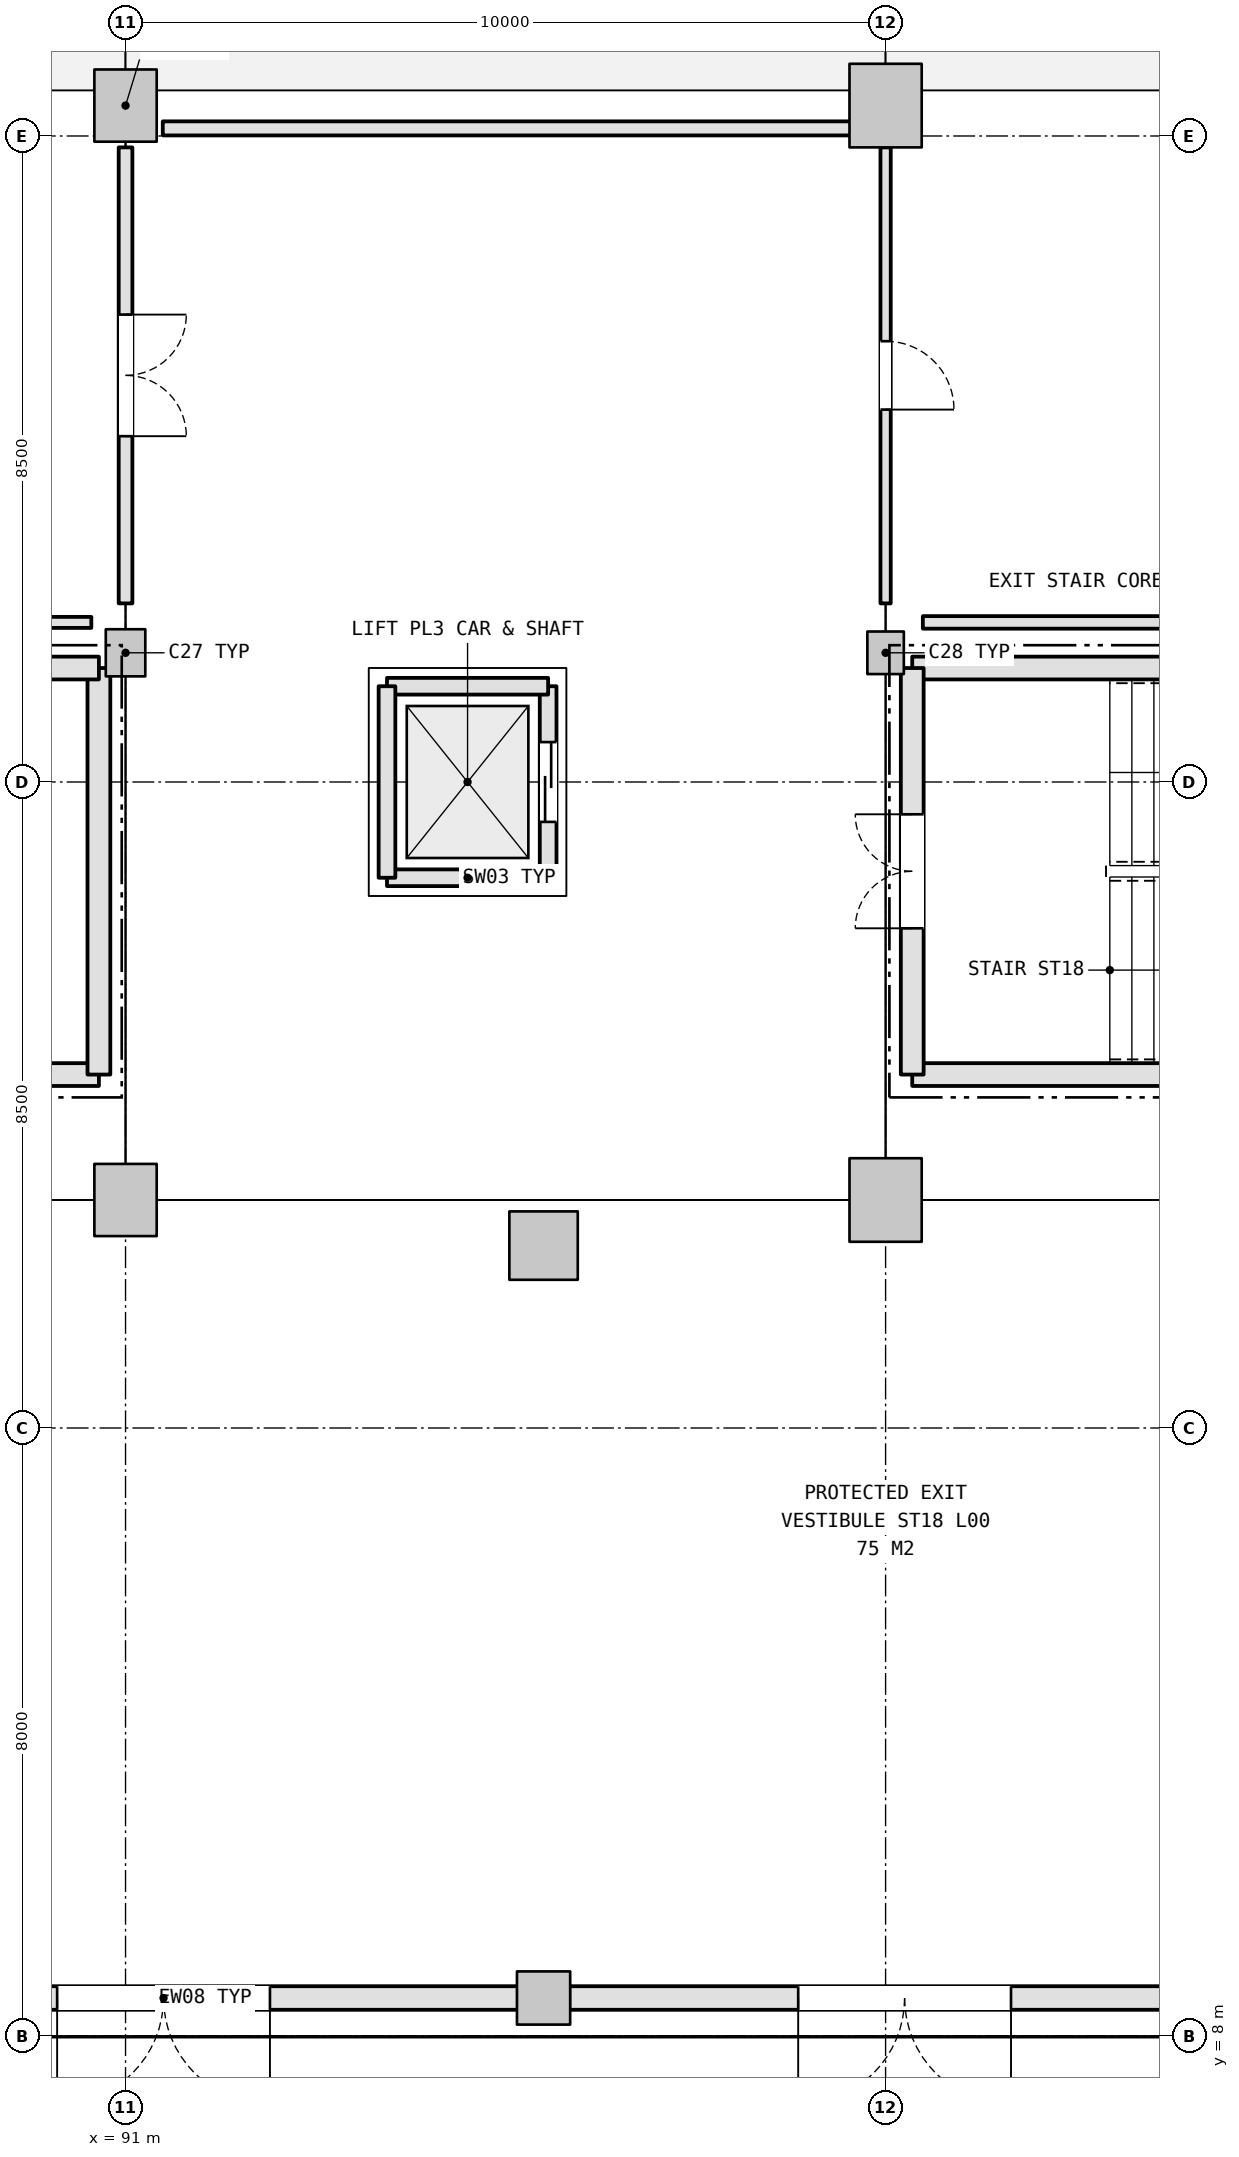
"""IFC4 building model, lengths in metres.
Left out: names, types, materials, properties, quantities, classifications, styles, units other than length and angle.
Written with IfcOpenShell. Run it as: python <this file> out.ifc"""

import sys

from ifc_helpers import new_model, si_unit, direction, frame, frame_2d, origin, origin_2d, place, context, subcontext, project, spatial, rectangle, extrude, element, fill, save


model = new_model("IFC4")
c1 = context("Model", 3, precision=1e-05, world=origin(), true_north=direction((0.0, 1.0)))
c2 = subcontext(c1, "Body", "Model", "MODEL_VIEW")
j1 = project(units=[si_unit("LENGTHUNIT", "METRE"), si_unit("PLANEANGLEUNIT", "RADIAN")], contexts=[c1])
p1 = place(None, origin())
s1 = spatial("IfcSite", under=j1, at=p1, CompositionType="ELEMENT")
p2 = place(p1, origin())
s2 = spatial("IfcBuilding", under=s1, at=p2, CompositionType="ELEMENT")
p3 = place(p2, origin())
s3 = spatial("IfcBuildingStorey", under=s2, at=p3, CompositionType="ELEMENT", Elevation=0.0)
p4 = place(p3, frame((91.0, 33.4, 0.0), z_axis=(0.0, 0.0, 1.0), x_axis=(1.0, 0.0, 0.0)))
e1 = element("IfcColumn", 1, at=p4, inside=s3, PredefinedType="COLUMN", context=c2, shape_type="SweptSolid", body=[
    extrude(rectangle(XDim=0.82, YDim=0.95, at=origin_2d()), origin(), (0.0, 0.0, 1.0), 5.4),
])
p5 = place(p3, frame((91.0, 26.2, 0.0), z_axis=(0.0, 0.0, 1.0), x_axis=(1.0, 0.0, 0.0)))
e2 = element("IfcColumn", 2, at=p5, inside=s3, PredefinedType="COLUMN", context=c2, shape_type="SweptSolid", body=[
    extrude(rectangle(XDim=0.52, YDim=0.62, at=origin_2d()), origin(), (0.0, 0.0, 1.0), 5.4),
])
p6 = place(p3, frame((91.0, 19.0, 0.0), z_axis=(0.0, 0.0, 1.0), x_axis=(1.0, 0.0, 0.0)))
e3 = element("IfcColumn", 3, at=p6, inside=s3, PredefinedType="COLUMN", context=c2, shape_type="SweptSolid", body=[
    extrude(rectangle(XDim=0.82, YDim=0.95, at=origin_2d()), origin(), (0.0, 0.0, 1.0), 5.4),
])
p7 = place(p3, frame((101.0, 33.4, 0.0), z_axis=(0.0, 0.0, 1.0), x_axis=(1.0, 0.0, 0.0)))
e4 = element("IfcColumn", 4, at=p7, inside=s3, PredefinedType="COLUMN", context=c2, shape_type="SweptSolid", body=[
    extrude(rectangle(XDim=0.95, YDim=1.1, at=origin_2d()), origin(), (0.0, 0.0, 1.0), 5.4),
])
p8 = place(p3, frame((101.0, 26.2, 0.0), z_axis=(0.0, 0.0, 1.0), x_axis=(1.0, 0.0, 0.0)))
e5 = element("IfcColumn", 5, at=p8, inside=s3, PredefinedType="COLUMN", context=c2, shape_type="SweptSolid", body=[
    extrude(rectangle(XDim=0.48, YDim=0.56, at=origin_2d()), origin(), (0.0, 0.0, 1.0), 5.4),
])
p9 = place(p3, frame((101.0, 19.0, 0.0), z_axis=(0.0, 0.0, 1.0), x_axis=(1.0, 0.0, 0.0)))
e6 = element("IfcColumn", 6, at=p9, inside=s3, PredefinedType="COLUMN", context=c2, shape_type="SweptSolid", body=[
    extrude(rectangle(XDim=0.95, YDim=1.1, at=origin_2d()), origin(), (0.0, 0.0, 1.0), 5.4),
])
p10 = place(p3, frame((96.5, 8.5, 0.0), z_axis=(0.0, 0.0, 1.0), x_axis=(1.0, 0.0, 0.0)))
e7 = element("IfcColumn", 7, at=p10, inside=s3, PredefinedType="COLUMN", context=c2, shape_type="SweptSolid", body=[
    extrude(rectangle(XDim=0.7, YDim=0.7, at=origin_2d()), origin(), (0.0, 0.0, 1.0), 5.4),
])
p11 = place(p3, frame((96.5, 18.4, 0.0), z_axis=(0.0, 0.0, 1.0), x_axis=(1.0, 0.0, 0.0)))
e8 = element("IfcColumn", 8, at=p11, inside=s3, PredefinedType="COLUMN", context=c2, shape_type="SweptSolid", body=[
    extrude(rectangle(XDim=0.9, YDim=0.9, at=origin_2d()), origin(), (0.0, 0.0, 1.0), 5.4),
])
p12 = place(p3, frame((86.838, 8.5, 0.0), z_axis=(0.0, 0.0, 1.0), x_axis=(1.0, 0.0, 0.0)))
e9 = element("IfcWall", 9, at=p12, inside=s3, PredefinedType="STANDARD", context=c2, shape_type="SweptSolid", body=[
    extrude(rectangle(XDim=9.324, YDim=0.31, at=frame_2d((4.662, 0.0))), origin(), (0.0, 0.0, 1.0), 4.592),
])
p13 = place(p12, frame((3.262, 0.0, 0.0)))
e10 = element("IfcOpeningElement", 10, at=p13, cuts=e9, PredefinedType="OPENING", context=c2, shape_type="SweptSolid", body=[
    extrude(rectangle(XDim=2.8, YDim=2.5, at=frame_2d((1.4, 1.25))), frame((0.0, 0.165, 0.0), z_axis=(0.0, -1.0, 0.0), x_axis=(1.0, 0.0, 0.0)), (0.0, 0.0, 1.0), 0.33),
])
p14 = place(p3, frame((96.838, 8.5, 0.0), z_axis=(0.0, 0.0, 1.0), x_axis=(1.0, 0.0, 0.0)))
e11 = element("IfcWall", 11, at=p14, inside=s3, PredefinedType="STANDARD", context=c2, shape_type="SweptSolid", body=[
    extrude(rectangle(XDim=8.824, YDim=0.31, at=frame_2d((4.412, 0.0))), origin(), (0.0, 0.0, 1.0), 4.592),
])
p15 = place(p14, frame((3.012, 0.0, 0.0)))
e12 = element("IfcOpeningElement", 12, at=p15, cuts=e11, PredefinedType="OPENING", context=c2, shape_type="SweptSolid", body=[
    extrude(rectangle(XDim=2.8, YDim=2.5, at=frame_2d((1.4, 1.25))), frame((0.0, 0.165, 0.0), z_axis=(0.0, -1.0, 0.0), x_axis=(1.0, 0.0, 0.0)), (0.0, 0.0, 1.0), 0.33),
])
p16 = place(p3, frame((81.35, 20.65, 0.0), z_axis=(0.0, 0.0, 1.0), x_axis=(1.0, 0.0, 0.0)))
e13 = element("IfcWall", 13, at=p16, inside=s3, PredefinedType="SHEAR", context=c2, shape_type="SweptSolid", body=[
    extrude(rectangle(XDim=9.299, YDim=0.3, at=frame_2d((4.65, 0.0))), origin(), (0.0, 0.0, 1.0), 5.14),
])
p17 = place(p3, frame((90.65, 20.65, 0.0), z_axis=(0.0, 0.0, 1.0), x_axis=(0.0, 1.0, 0.0)))
e14 = element("IfcWall", 14, at=p17, inside=s3, PredefinedType="SHEAR", context=c2, shape_type="SweptSolid", body=[
    extrude(rectangle(XDim=5.349, YDim=0.3, at=frame_2d((2.675, 0.0))), origin(), (0.0, 0.0, 1.0), 5.14),
])
for number, where, z_axis, x_axis in (
    (15, (90.65, 26.0, 0.0), (0.0, 0.0, 1.0), (-1.0, 0.0, 0.0)),
    (16, (101.35, 20.65, 0.0), (0.0, 0.0, 1.0), (1.0, 0.0, 0.0)),
    (17, (110.65, 26.0, 0.0), (0.0, 0.0, 1.0), (-1.0, 0.0, 0.0)),
):
    element("IfcWall", number, at=place(p3, frame(where, z_axis=z_axis, x_axis=x_axis)), inside=s3, PredefinedType="SHEAR", context=c2, shape_type="SweptSolid", body=[
        extrude(rectangle(XDim=9.299, YDim=0.3, at=frame_2d((4.65, 0.0))), origin(), (0.0, 0.0, 1.0), 5.14),
    ])
p18 = place(p3, frame((101.35, 26.0, 0.0), z_axis=(0.0, 0.0, 1.0), x_axis=(0.0, -1.0, 0.0)))
e18 = element("IfcWall", 18, at=p18, inside=s3, PredefinedType="SHEAR", context=c2, shape_type="SweptSolid", body=[
    extrude(rectangle(XDim=5.349, YDim=0.3, at=frame_2d((2.675, 0.0))), origin(), (0.0, 0.0, 1.0), 5.14),
])
p19 = place(p18, frame((1.925, 0.0, 0.0)))
e19 = element("IfcOpeningElement", 19, at=p19, cuts=e18, PredefinedType="OPENING", context=c2, shape_type="SweptSolid", body=[
    extrude(rectangle(XDim=1.5, YDim=2.2, at=frame_2d((0.75, 1.1))), frame((0.0, 0.16, 0.0), z_axis=(0.0, -1.0, 0.0), x_axis=(1.0, 0.0, 0.0)), (0.0, 0.0, 1.0), 0.32),
])
p20 = place(p3, frame((94.44, 23.24, -1.1), z_axis=(0.0, 0.0, 1.0), x_axis=(1.0, 0.0, 0.0)))
e20 = element("IfcWall", 20, at=p20, inside=s3, PredefinedType="SHEAR", context=c2, shape_type="SweptSolid", body=[
    extrude(rectangle(XDim=2.12, YDim=0.22, at=frame_2d((1.06, 0.0))), origin(), (0.0, 0.0, 1.0), 6.24),
])
p21 = place(p3, frame((96.56, 23.24, -1.1), z_axis=(0.0, 0.0, 1.0), x_axis=(0.0, 1.0, 0.0)))
e21 = element("IfcWall", 21, at=p21, inside=s3, PredefinedType="SHEAR", context=c2, shape_type="SweptSolid", body=[
    extrude(rectangle(XDim=2.52, YDim=0.22, at=frame_2d((1.26, 0.0))), origin(), (0.0, 0.0, 1.0), 6.24),
])
p22 = place(p21, frame((0.735, 0.0, 1.1)))
e22 = element("IfcOpeningElement", 22, at=p22, cuts=e21, PredefinedType="OPENING", context=c2, shape_type="SweptSolid", body=[
    extrude(rectangle(XDim=1.05, YDim=2.15, at=frame_2d((0.525, 1.075))), frame((0.0, 0.12, 0.0), z_axis=(0.0, -1.0, 0.0), x_axis=(1.0, 0.0, 0.0)), (0.0, 0.0, 1.0), 0.24),
])
p23 = place(p3, frame((96.56, 25.76, -1.1), z_axis=(0.0, 0.0, 1.0), x_axis=(-1.0, 0.0, 0.0)))
e23 = element("IfcWall", 23, at=p23, inside=s3, PredefinedType="SHEAR", context=c2, shape_type="SweptSolid", body=[
    extrude(rectangle(XDim=2.12, YDim=0.22, at=frame_2d((1.06, 0.0))), origin(), (0.0, 0.0, 1.0), 6.24),
])
p24 = place(p3, frame((94.44, 25.76, -1.1), z_axis=(0.0, 0.0, 1.0), x_axis=(0.0, -1.0, 0.0)))
e24 = element("IfcWall", 24, at=p24, inside=s3, PredefinedType="SHEAR", context=c2, shape_type="SweptSolid", body=[
    extrude(rectangle(XDim=2.52, YDim=0.22, at=frame_2d((1.26, 0.0))), origin(), (0.0, 0.0, 1.0), 6.24),
])
p25 = place(p3, frame((91.0, 32.85, 0.0), z_axis=(0.0, 0.0, 1.0), x_axis=(0.0, -1.0, 0.0)))
e25 = element("IfcWall", 25, at=p25, inside=s3, PredefinedType="PARTITIONING", context=c2, shape_type="SweptSolid", body=[
    extrude(rectangle(XDim=6.0, YDim=0.18, at=frame_2d((3.0, 0.0))), origin(), (0.0, 0.0, 1.0), 4.305),
])
p26 = place(p25, frame((2.2, 0.0, 0.0)))
e26 = element("IfcOpeningElement", 26, at=p26, cuts=e25, PredefinedType="OPENING", context=c2, shape_type="SweptSolid", body=[
    extrude(rectangle(XDim=1.6, YDim=2.2, at=frame_2d((0.8, 1.1))), frame((0.0, 0.1, 0.0), z_axis=(0.0, -1.0, 0.0), x_axis=(1.0, 0.0, 0.0)), (0.0, 0.0, 1.0), 0.2),
])
p27 = place(p3, frame((90.55, 26.6, 0.0), z_axis=(0.0, 0.0, 1.0), x_axis=(-1.0, 0.0, 0.0)))
e27 = element("IfcWall", 27, at=p27, inside=s3, PredefinedType="PARTITIONING", context=c2, shape_type="SweptSolid", body=[
    extrude(rectangle(XDim=9.06, YDim=0.145, at=frame_2d((4.53, 0.0))), origin(), (0.0, 0.0, 1.0), 5.12),
])
p28 = place(p3, frame((101.0, 32.85, 0.0), z_axis=(0.0, 0.0, 1.0), x_axis=(0.0, -1.0, 0.0)))
e28 = element("IfcWall", 28, at=p28, inside=s3, PredefinedType="PARTITIONING", context=c2, shape_type="SweptSolid", body=[
    extrude(rectangle(XDim=6.0, YDim=0.135, at=frame_2d((3.0, 0.0))), origin(), (0.0, 0.0, 1.0), 4.345),
])
p29 = place(p28, frame((2.55, 0.0, 0.0)))
e29 = element("IfcOpeningElement", 29, at=p29, cuts=e28, PredefinedType="OPENING", context=c2, shape_type="SweptSolid", body=[
    extrude(rectangle(XDim=0.9, YDim=2.1, at=frame_2d((0.45, 1.05))), frame((0.0, 0.077, 0.0), z_axis=(0.0, -1.0, 0.0), x_axis=(1.0, 0.0, 0.0)), (0.0, 0.0, 1.0), 0.155),
])
p30 = place(p3, frame((91.49, 33.1, 0.0), z_axis=(0.0, 0.0, 1.0), x_axis=(1.0, 0.0, 0.0)))
e30 = element("IfcWall", 30, at=p30, inside=s3, PredefinedType="PARTITIONING", context=c2, shape_type="SweptSolid", body=[
    extrude(rectangle(XDim=9.06, YDim=0.185, at=frame_2d((4.53, 0.0))), origin(), (0.0, 0.0, 1.0), 4.325),
])
p31 = place(p3, frame((110.55, 26.6, 0.0), z_axis=(0.0, 0.0, 1.0), x_axis=(-1.0, 0.0, 0.0)))
e31 = element("IfcWall", 31, at=p31, inside=s3, PredefinedType="PARTITIONING", context=c2, shape_type="SweptSolid", body=[
    extrude(rectangle(XDim=9.06, YDim=0.165, at=frame_2d((4.53, 0.0))), origin(), (0.0, 0.0, 1.0), 5.12),
])
p32 = place(p13, frame((2.8, 0.0, 0.0), z_axis=(0.0, 0.0, 1.0), x_axis=(-1.0, 0.0, 0.0)))
e32 = element("IfcDoor", 32, at=p32, inside=s3, OperationType="DOUBLE_DOOR_SINGLE_SWING", PredefinedType="DOOR", context=c2, shape_type="SweptSolid", body=[
    extrude(rectangle(XDim=2.8, YDim=2.5, at=frame_2d((1.4, 1.25))), frame((0.0, 0.025, 0.0), z_axis=(0.0, -1.0, 0.0), x_axis=(1.0, 0.0, 0.0)), (0.0, 0.0, 1.0), 0.05),
])
fill(e10, e32)
p33 = place(p15, frame((2.8, 0.0, 0.0), z_axis=(0.0, 0.0, 1.0), x_axis=(-1.0, 0.0, 0.0)))
e33 = element("IfcDoor", 33, at=p33, inside=s3, OperationType="DOUBLE_DOOR_SINGLE_SWING", PredefinedType="DOOR", context=c2, shape_type="SweptSolid", body=[
    extrude(rectangle(XDim=2.8, YDim=2.5, at=frame_2d((1.4, 1.25))), frame((0.0, 0.025, 0.0), z_axis=(0.0, -1.0, 0.0), x_axis=(1.0, 0.0, 0.0)), (0.0, 0.0, 1.0), 0.05),
])
fill(e12, e33)
p34 = place(p19, frame((1.5, 0.0, 0.0), z_axis=(0.0, 0.0, 1.0), x_axis=(-1.0, 0.0, 0.0)))
e34 = element("IfcDoor", 34, at=p34, inside=s3, OperationType="DOUBLE_DOOR_SINGLE_SWING", PredefinedType="DOOR", context=c2, shape_type="SweptSolid", body=[
    extrude(rectangle(XDim=1.5, YDim=2.2, at=frame_2d((0.75, 1.1))), frame((0.0, 0.025, 0.0), z_axis=(0.0, -1.0, 0.0), x_axis=(1.0, 0.0, 0.0)), (0.0, 0.0, 1.0), 0.05),
])
fill(e19, e34)
p35 = place(p22, origin())
e35 = element("IfcDoor", 35, at=p35, inside=s3, OperationType="DOUBLE_DOOR_SLIDING", PredefinedType="DOOR", context=c2, shape_type="SweptSolid", body=[
    extrude(rectangle(XDim=1.05, YDim=2.15, at=frame_2d((0.525, 1.075))), frame((0.0, 0.025, 0.0), z_axis=(0.0, -1.0, 0.0), x_axis=(1.0, 0.0, 0.0)), (0.0, 0.0, 1.0), 0.05),
])
fill(e22, e35)
p36 = place(p26, origin())
e36 = element("IfcDoor", 36, at=p36, inside=s3, OperationType="DOUBLE_DOOR_SINGLE_SWING", PredefinedType="DOOR", context=c2, shape_type="SweptSolid", body=[
    extrude(rectangle(XDim=1.6, YDim=2.2, at=frame_2d((0.8, 1.1))), frame((0.0, 0.025, 0.0), z_axis=(0.0, -1.0, 0.0), x_axis=(1.0, 0.0, 0.0)), (0.0, 0.0, 1.0), 0.05),
])
fill(e26, e36)
p37 = place(p29, origin())
e37 = element("IfcDoor", 37, at=p37, inside=s3, OperationType="SINGLE_SWING_RIGHT", PredefinedType="DOOR", context=c2, shape_type="SweptSolid", body=[
    extrude(rectangle(XDim=0.9, YDim=2.1, at=frame_2d((0.45, 1.05))), frame((0.0, 0.025, 0.0), z_axis=(0.0, -1.0, 0.0), x_axis=(1.0, 0.0, 0.0)), (0.0, 0.0, 1.0), 0.05),
])
fill(e29, e37)
save(model, sys.argv[1])
